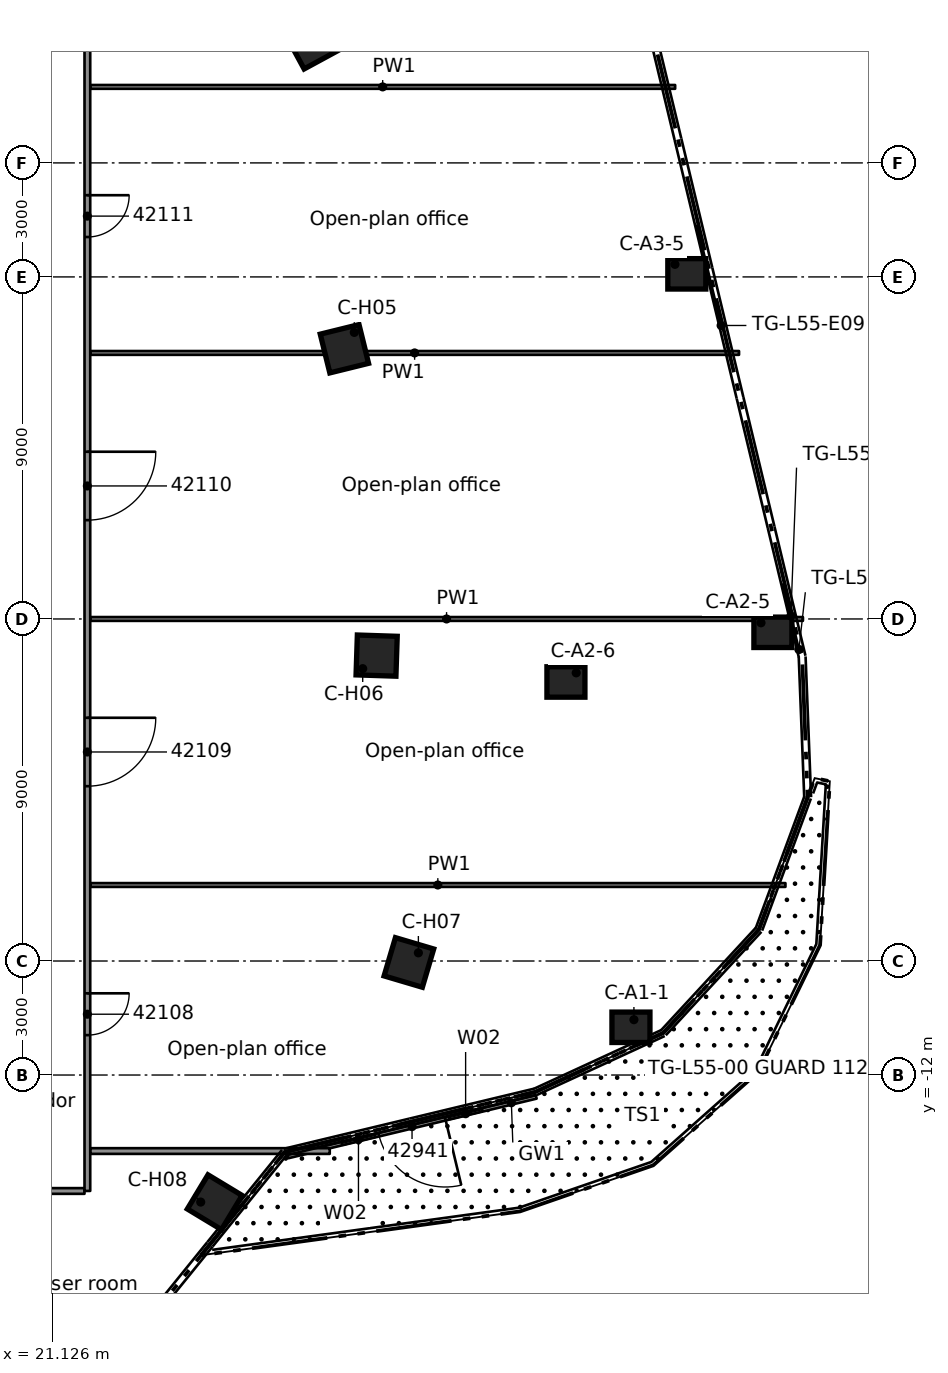
"""IFC4 building model, lengths in metres.
Left out: names, types, materials, properties, quantities, classifications, styles, units other than length and angle.
Written with IfcOpenShell. Run it as: python <this file> out.ifc"""

import sys

from ifc_helpers import new_model, si_unit, direction, frame, frame_2d, origin, origin_2d, place, context, subcontext, project, spatial, rectangle, extrude, element, fill, save


model = new_model("IFC4")
c1 = context("Model", 3, precision=1e-05, world=origin(), true_north=direction((0.0, 1.0)))
c2 = subcontext(c1, "Body", "Model", "MODEL_VIEW")
j1 = project(units=[si_unit("LENGTHUNIT", "METRE"), si_unit("PLANEANGLEUNIT", "RADIAN")], contexts=[c1])
p1 = place(None, origin())
s1 = spatial("IfcSite", under=j1, at=p1, CompositionType="ELEMENT")
p2 = place(p1, origin())
s2 = spatial("IfcBuilding", under=s1, at=p2, CompositionType="ELEMENT")
p3 = place(p2, frame((0.0, 0.0, 210.5)))
s3 = spatial("IfcBuildingStorey", under=s2, at=p3, CompositionType="ELEMENT", Elevation=210.5)
for number, where, z_axis, x_axis in (
    (1, (36.355, -10.744, 0.0), (0.0, 0.0, 1.0), (1.0, 0.0, 0.0)),
    (2, (40.09, -0.351, 0.0), (0.0, 0.0, 1.0), (1.0, 0.0, 0.0)),
    (3, (34.644, -1.658, 0.0), (0.0, 0.0, 1.0), (1.0, 0.0, 0.0)),
    (4, (37.825, 9.081, 0.0), (0.0, 0.0, 1.0), (1.0, 0.0, 0.0)),
):
    element("IfcColumn", number, at=place(p3, frame(where, z_axis=z_axis, x_axis=x_axis)), inside=s3, PredefinedType="COLUMN", context=c2, shape_type="SweptSolid", body=[
        extrude(rectangle(XDim=1.0, YDim=0.8, at=origin_2d()), origin(), (0.0, 0.0, 1.0), 3.5),
    ])
for number, where, z_axis, x_axis in (
    (5, (27.966, 15.184, 0.0), (0.0, 0.0, 1.0), (0.879, 0.477, 0.0)),
    (6, (28.815, 7.11, 0.0), (0.0, 0.0, 1.0), (0.971, 0.24, 0.0)),
    (7, (29.663, -0.964, 0.0), (0.0, 0.0, 1.0), (0.999, -0.032, 0.0)),
    (8, (30.512, -9.038, 0.0), (0.0, 0.0, 1.0), (0.959, -0.284, 0.0)),
    (9, (25.403, -15.347, 0.0), (0.0, 0.0, 1.0), (0.856, -0.517, 0.0)),
):
    element("IfcColumn", number, at=place(p3, frame(where, z_axis=z_axis, x_axis=x_axis)), inside=s3, PredefinedType="COLUMN", context=c2, shape_type="SweptSolid", body=[
        extrude(rectangle(XDim=1.05, YDim=1.05, at=origin_2d()), origin(), (0.0, 0.0, 1.0), 3.5),
    ])
p4 = place(p3, frame((33.862, -12.573, 0.0), z_axis=(0.0, 0.0, 1.0), x_axis=(-0.97236553207, -0.233463641798, 0.0)))
e10 = element("IfcWall", 10, at=p4, inside=s3, PredefinedType="STANDARD", context=c2, shape_type="SweptSolid", body=[
    extrude(rectangle(XDim=6.72, YDim=0.1, at=frame_2d((3.36, 0.0))), origin(), (0.0, 0.0, 1.0), 3.1),
])
p5 = place(p4, frame((2.46, 0.0, 0.0)))
e11 = element("IfcOpeningElement", 11, at=p5, cuts=e10, PredefinedType="OPENING", context=c2, shape_type="SweptSolid", body=[
    extrude(rectangle(XDim=1.8, YDim=2.4, at=frame_2d((0.9, 1.2))), frame((0.0, 0.06, 0.0), z_axis=(0.0, -1.0, 0.0), x_axis=(1.0, 0.0, 0.0)), (0.0, 0.0, 1.0), 0.12),
])
p6 = place(p4, frame((1.46, 0.0, 0.0)))
e12 = element("IfcOpeningElement", 12, at=p6, cuts=e10, PredefinedType="OPENING", context=c2, shape_type="SweptSolid", body=[
    extrude(rectangle(XDim=0.9, YDim=2.4, at=frame_2d((0.45, 1.2))), frame((0.0, 0.06, 0.0), z_axis=(0.0, -1.0, 0.0), x_axis=(1.0, 0.0, 0.0)), (0.0, 0.0, 1.0), 0.12),
])
p7 = place(p4, frame((4.36, 0.0, 0.0)))
e13 = element("IfcOpeningElement", 13, at=p7, cuts=e10, PredefinedType="OPENING", context=c2, shape_type="SweptSolid", body=[
    extrude(rectangle(XDim=0.9, YDim=2.4, at=frame_2d((0.45, 1.2))), frame((0.0, 0.06, 0.0), z_axis=(0.0, -1.0, 0.0), x_axis=(1.0, 0.0, 0.0)), (0.0, 0.0, 1.0), 0.12),
])
p8 = place(p3, frame((15.179, -15.179, 0.0), z_axis=(0.0, 0.0, 1.0), x_axis=(0.707106781187, -0.707106781187, 0.0)))
e14 = element("IfcWall", 14, at=p8, inside=s3, PredefinedType="PARTITIONING", context=c2, shape_type="SweptSolid", body=[
    extrude(rectangle(XDim=8.949, YDim=0.15, at=frame_2d((4.475, 0.0))), origin(), (0.0, 0.0, 1.0), 3.08),
])
p9 = place(p3, frame((21.975, -15.051, 0.0), z_axis=(0.0, 0.0, 1.0), x_axis=(-1.0, 0.0, 0.0)))
e15 = element("IfcWall", 15, at=p9, inside=s3, PredefinedType="PARTITIONING", context=c2, shape_type="SweptSolid", body=[
    extrude(rectangle(XDim=10.984, YDim=0.15, at=frame_2d((5.492, 0.0))), origin(), (0.0, 0.0, 1.0), 3.08),
])
p10 = place(p9, frame((3.025, 0.0, 0.0)))
e16 = element("IfcOpeningElement", 16, at=p10, cuts=e15, PredefinedType="OPENING", context=c2, shape_type="SweptSolid", body=[
    extrude(rectangle(XDim=0.9, YDim=2.1, at=frame_2d((0.45, 1.05))), frame((0.0, 0.085, 0.0), z_axis=(0.0, -1.0, 0.0), x_axis=(1.0, 0.0, 0.0)), (0.0, 0.0, 1.0), 0.17),
])
p11 = place(p3, frame((22.126, -14.0, 0.0), z_axis=(0.0, 0.0, 1.0), x_axis=(1.0, 0.0, 0.0)))
e17 = element("IfcWall", 17, at=p11, inside=s3, PredefinedType="PARTITIONING", context=c2, shape_type="SweptSolid", body=[
    extrude(rectangle(XDim=6.303, YDim=0.15, at=frame_2d((3.151, 0.0))), origin(), (0.0, 0.0, 1.0), 3.08),
])
p12 = place(p3, frame((22.126, -7.0, 0.0), z_axis=(0.0, 0.0, 1.0), x_axis=(1.0, 0.0, 0.0)))
e18 = element("IfcWall", 18, at=p12, inside=s3, PredefinedType="PARTITIONING", context=c2, shape_type="SweptSolid", body=[
    extrude(rectangle(XDim=18.294, YDim=0.1, at=frame_2d((9.147, 0.0))), origin(), (0.0, 0.0, 1.0), 3.08),
])
p13 = place(p3, frame((22.126, 0.0, 0.0), z_axis=(0.0, 0.0, 1.0), x_axis=(1.0, 0.0, 0.0)))
e19 = element("IfcWall", 19, at=p13, inside=s3, PredefinedType="PARTITIONING", context=c2, shape_type="SweptSolid", body=[
    extrude(rectangle(XDim=18.754, YDim=0.1, at=frame_2d((9.377, 0.0))), origin(), (0.0, 0.0, 1.0), 3.08),
])
p14 = place(p3, frame((22.126, 7.0, 0.0), z_axis=(0.0, 0.0, 1.0), x_axis=(1.0, 0.0, 0.0)))
e20 = element("IfcWall", 20, at=p14, inside=s3, PredefinedType="PARTITIONING", context=c2, shape_type="SweptSolid", body=[
    extrude(rectangle(XDim=17.073, YDim=0.1, at=frame_2d((8.537, 0.0))), origin(), (0.0, 0.0, 1.0), 3.08),
])
p15 = place(p3, frame((22.126, 14.0, 0.0), z_axis=(0.0, 0.0, 1.0), x_axis=(1.0, 0.0, 0.0)))
e21 = element("IfcWall", 21, at=p15, inside=s3, PredefinedType="PARTITIONING", context=c2, shape_type="SweptSolid", body=[
    extrude(rectangle(XDim=15.392, YDim=0.1, at=frame_2d((7.696, 0.0))), origin(), (0.0, 0.0, 1.0), 3.08),
])
p16 = place(p3, frame((22.051, 15.05, 0.0), z_axis=(0.0, 0.0, 1.0), x_axis=(0.0, -1.0, 0.0)))
e22 = element("IfcWall", 22, at=p16, inside=s3, PredefinedType="PARTITIONING", context=c2, shape_type="SweptSolid", body=[
    extrude(rectangle(XDim=30.1, YDim=0.15, at=frame_2d((15.05, 0.0))), origin(), (0.0, 0.0, 1.0), 3.08),
])
p17 = place(p16, frame((24.9, 0.0, 0.0)))
e23 = element("IfcOpeningElement", 23, at=p17, cuts=e22, PredefinedType="OPENING", context=c2, shape_type="SweptSolid", body=[
    extrude(rectangle(XDim=1.1, YDim=2.1, at=frame_2d((0.55, 1.05))), frame((0.0, 0.085, 0.0), z_axis=(0.0, -1.0, 0.0), x_axis=(1.0, 0.0, 0.0)), (0.0, 0.0, 1.0), 0.17),
])
p18 = place(p16, frame((17.65, 0.0, 0.0)))
e24 = element("IfcOpeningElement", 24, at=p18, cuts=e22, PredefinedType="OPENING", context=c2, shape_type="SweptSolid", body=[
    extrude(rectangle(XDim=1.8, YDim=2.1, at=frame_2d((0.9, 1.05))), frame((0.0, 0.085, 0.0), z_axis=(0.0, -1.0, 0.0), x_axis=(1.0, 0.0, 0.0)), (0.0, 0.0, 1.0), 0.17),
])
p19 = place(p16, frame((10.65, 0.0, 0.0)))
e25 = element("IfcOpeningElement", 25, at=p19, cuts=e22, PredefinedType="OPENING", context=c2, shape_type="SweptSolid", body=[
    extrude(rectangle(XDim=1.8, YDim=2.1, at=frame_2d((0.9, 1.05))), frame((0.0, 0.085, 0.0), z_axis=(0.0, -1.0, 0.0), x_axis=(1.0, 0.0, 0.0)), (0.0, 0.0, 1.0), 0.17),
])
p20 = place(p16, frame((3.9, 0.0, 0.0)))
e26 = element("IfcOpeningElement", 26, at=p20, cuts=e22, PredefinedType="OPENING", context=c2, shape_type="SweptSolid", body=[
    extrude(rectangle(XDim=1.1, YDim=2.1, at=frame_2d((0.55, 1.05))), frame((0.0, 0.085, 0.0), z_axis=(0.0, -1.0, 0.0), x_axis=(1.0, 0.0, 0.0)), (0.0, 0.0, 1.0), 0.17),
])
p21 = place(p5, origin())
e27 = element("IfcDoor", 27, at=p21, inside=s3, OperationType="DOUBLE_DOOR_SINGLE_SWING", PredefinedType="DOOR", context=c2, shape_type="SweptSolid", body=[
    extrude(rectangle(XDim=1.8, YDim=2.4, at=frame_2d((0.9, 1.2))), frame((0.0, 0.025, 0.0), z_axis=(0.0, -1.0, 0.0), x_axis=(1.0, 0.0, 0.0)), (0.0, 0.0, 1.0), 0.05),
])
fill(e11, e27)
p22 = place(p6, origin())
e28 = element("IfcWindow", 28, at=p22, inside=s3, PartitioningType="SINGLE_PANEL", PredefinedType="WINDOW", context=c2, shape_type="SweptSolid", body=[
    extrude(rectangle(XDim=0.9, YDim=2.4, at=frame_2d((0.45, 1.2))), frame((0.0, 0.03, 0.0), z_axis=(0.0, -1.0, 0.0), x_axis=(1.0, 0.0, 0.0)), (0.0, 0.0, 1.0), 0.06),
])
fill(e12, e28)
p23 = place(p7, origin())
e29 = element("IfcWindow", 29, at=p23, inside=s3, PartitioningType="SINGLE_PANEL", PredefinedType="WINDOW", context=c2, shape_type="SweptSolid", body=[
    extrude(rectangle(XDim=0.9, YDim=2.4, at=frame_2d((0.45, 1.2))), frame((0.0, 0.03, 0.0), z_axis=(0.0, -1.0, 0.0), x_axis=(1.0, 0.0, 0.0)), (0.0, 0.0, 1.0), 0.06),
])
fill(e13, e29)
p24 = place(p17, origin())
e30 = element("IfcDoor", 30, at=p24, inside=s3, OperationType="SINGLE_SWING_RIGHT", PredefinedType="DOOR", context=c2, shape_type="SweptSolid", body=[
    extrude(rectangle(XDim=1.1, YDim=2.1, at=frame_2d((0.55, 1.05))), frame((0.0, 0.025, 0.0), z_axis=(0.0, -1.0, 0.0), x_axis=(1.0, 0.0, 0.0)), (0.0, 0.0, 1.0), 0.05),
])
fill(e23, e30)
p25 = place(p18, origin())
e31 = element("IfcDoor", 31, at=p25, inside=s3, OperationType="DOUBLE_DOOR_SINGLE_SWING", PredefinedType="DOOR", context=c2, shape_type="SweptSolid", body=[
    extrude(rectangle(XDim=1.8, YDim=2.1, at=frame_2d((0.9, 1.05))), frame((0.0, 0.025, 0.0), z_axis=(0.0, -1.0, 0.0), x_axis=(1.0, 0.0, 0.0)), (0.0, 0.0, 1.0), 0.05),
])
fill(e24, e31)
p26 = place(p19, origin())
e32 = element("IfcDoor", 32, at=p26, inside=s3, OperationType="DOUBLE_DOOR_SINGLE_SWING", PredefinedType="DOOR", context=c2, shape_type="SweptSolid", body=[
    extrude(rectangle(XDim=1.8, YDim=2.1, at=frame_2d((0.9, 1.05))), frame((0.0, 0.025, 0.0), z_axis=(0.0, -1.0, 0.0), x_axis=(1.0, 0.0, 0.0)), (0.0, 0.0, 1.0), 0.05),
])
fill(e25, e32)
p27 = place(p20, origin())
e33 = element("IfcDoor", 33, at=p27, inside=s3, OperationType="SINGLE_SWING_LEFT", PredefinedType="DOOR", context=c2, shape_type="SweptSolid", body=[
    extrude(rectangle(XDim=1.1, YDim=2.1, at=frame_2d((0.55, 1.05))), frame((0.0, 0.025, 0.0), z_axis=(0.0, -1.0, 0.0), x_axis=(1.0, 0.0, 0.0)), (0.0, 0.0, 1.0), 0.05),
])
fill(e26, e33)
save(model, sys.argv[1])
